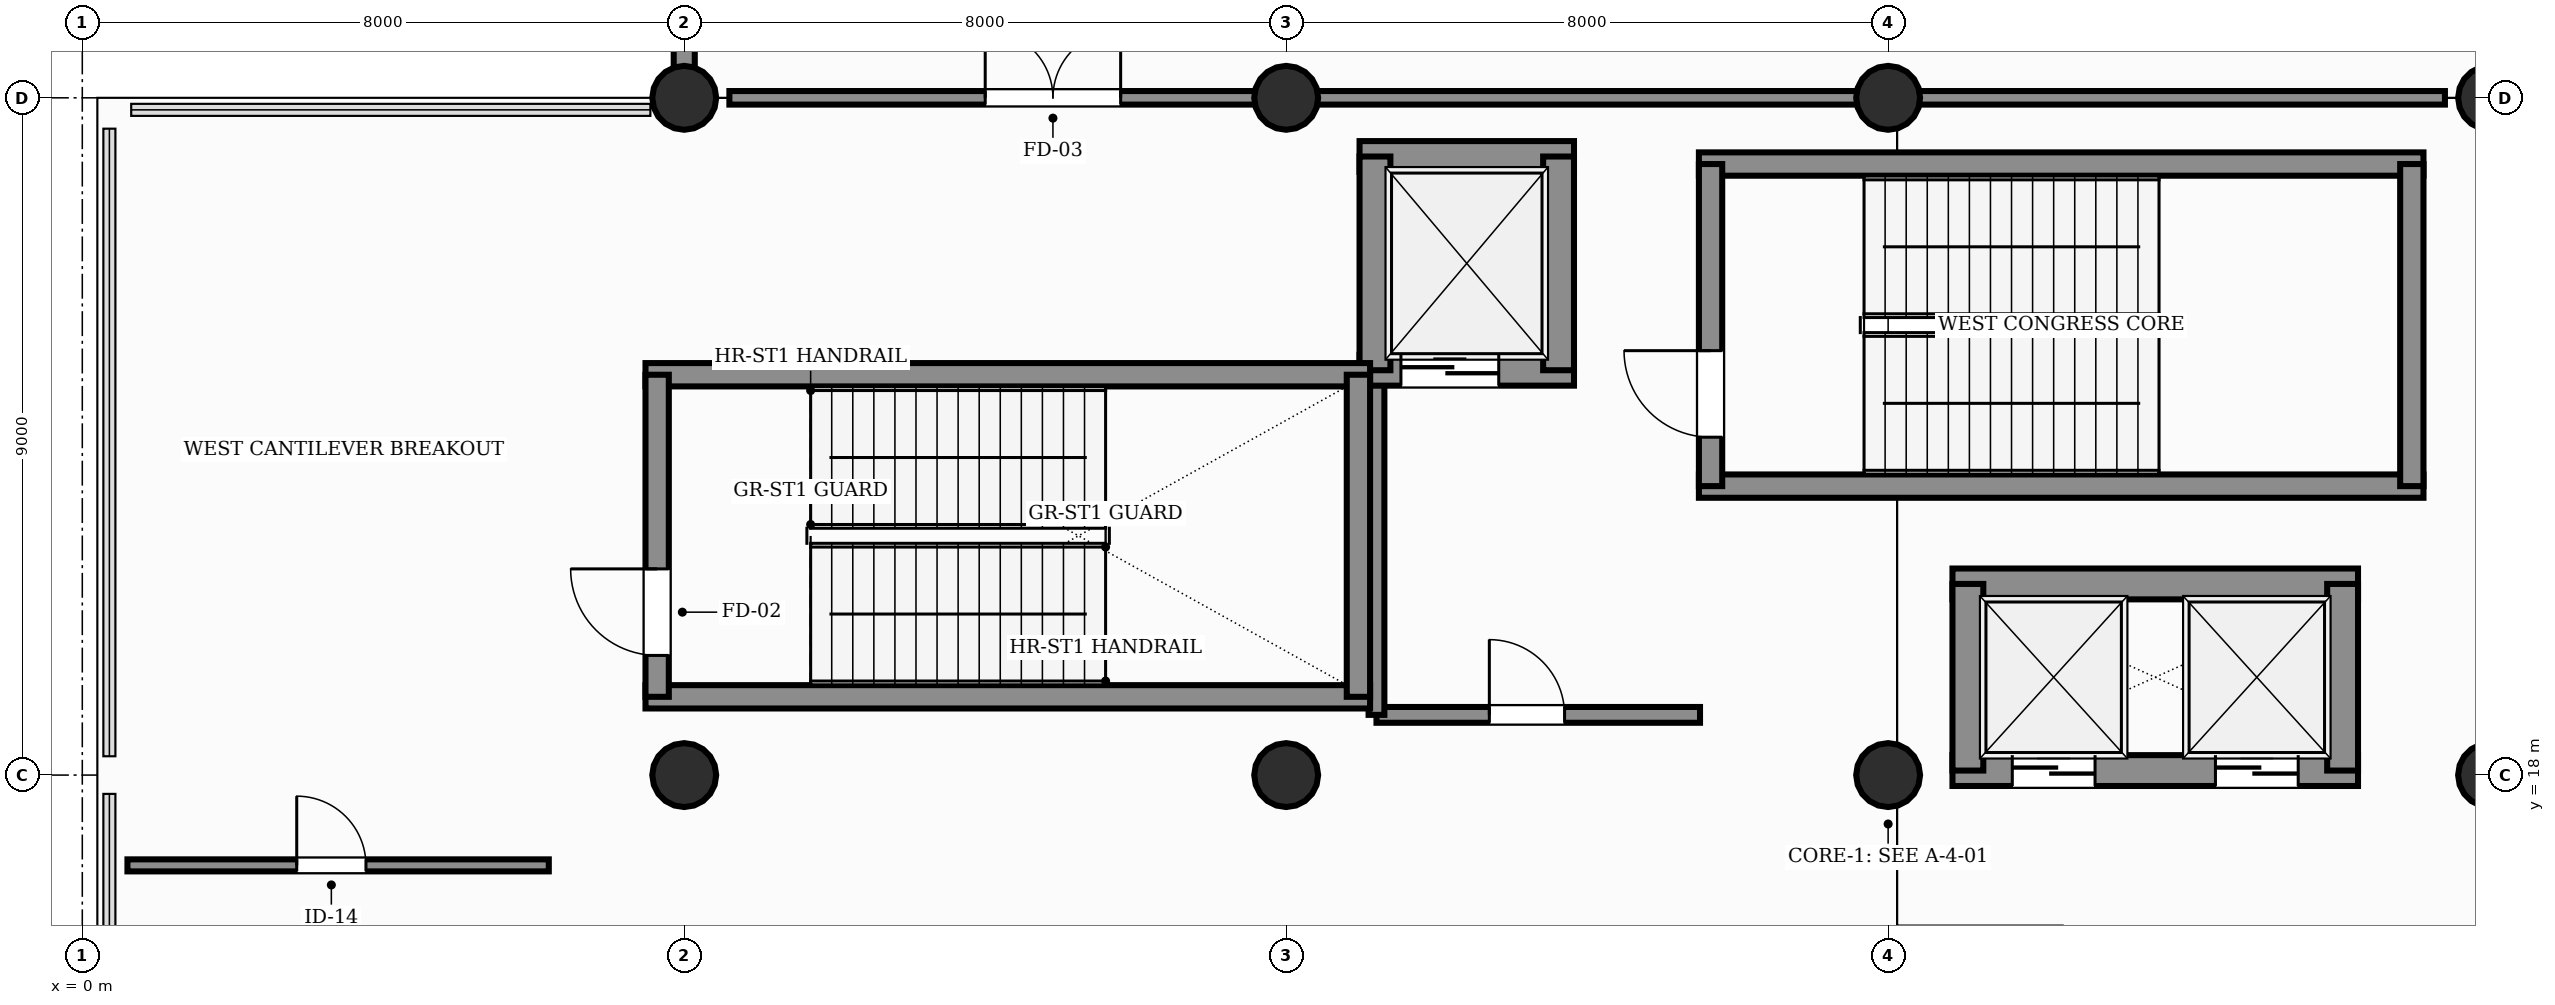
"""IFC4 building model, lengths in metres.
Left out: names, types, materials, properties, quantities, classifications, styles, units other than length and angle.
Written with IfcOpenShell. Run it as: python <this file> out.ifc"""

import sys

from ifc_helpers import new_model, si_unit, direction, frame, frame_2d, origin, origin_2d, place, context, subcontext, project, spatial, rectangle, circle, extrude, element, fill, save


model = new_model("IFC4")
c1 = context("Model", 3, precision=1e-05, world=origin(), true_north=direction((0.0, 1.0)))
c2 = subcontext(c1, "Body", "Model", "MODEL_VIEW")
j1 = project(units=[si_unit("LENGTHUNIT", "METRE"), si_unit("PLANEANGLEUNIT", "RADIAN")], contexts=[c1])
p1 = place(None, origin())
s1 = spatial("IfcSite", under=j1, at=p1, CompositionType="ELEMENT")
p2 = place(p1, origin())
s2 = spatial("IfcBuilding", under=s1, at=p2, CompositionType="ELEMENT")
p3 = place(p2, frame((0.0, 0.0, 6.0)))
s3 = spatial("IfcBuildingStorey", under=s2, at=p3, CompositionType="ELEMENT", Elevation=6.0)
for number, where, z_axis, x_axis in (
    (1, (8.0, 18.0, 0.0), (0.0, 0.0, 1.0), (1.0, 0.0, 0.0)),
    (2, (8.0, 27.0, 0.0), (0.0, 0.0, 1.0), (1.0, 0.0, 0.0)),
    (3, (16.0, 18.0, 0.0), (0.0, 0.0, 1.0), (1.0, 0.0, 0.0)),
    (4, (16.0, 27.0, 0.0), (0.0, 0.0, 1.0), (1.0, 0.0, 0.0)),
    (5, (24.0, 18.0, 0.0), (0.0, 0.0, 1.0), (1.0, 0.0, 0.0)),
    (6, (24.0, 27.0, 0.0), (0.0, 0.0, 1.0), (1.0, 0.0, 0.0)),
    (7, (32.0, 18.0, 0.0), (0.0, 0.0, 1.0), (1.0, 0.0, 0.0)),
    (8, (32.0, 27.0, 0.0), (0.0, 0.0, 1.0), (1.0, 0.0, 0.0)),
):
    element("IfcColumn", number, at=place(p3, frame(where, z_axis=z_axis, x_axis=x_axis)), inside=s3, PredefinedType="COLUMN", context=c2, shape_type="SweptSolid", body=[
        extrude(circle(Radius=0.425, at=origin_2d()), origin(), (0.0, 0.0, 1.0), 5.4),
    ])
p4 = place(p3, frame((8.0, 27.3, 0.0), z_axis=(0.0, 0.0, 1.0), x_axis=(0.0, 1.0, 0.0)))
e9 = element("IfcWall", 9, at=p4, inside=s3, PredefinedType="SOLIDWALL", context=c2, shape_type="SweptSolid", body=[
    extrude(rectangle(XDim=8.5, YDim=0.28, at=frame_2d((4.25, 0.0))), origin(), (0.0, 0.0, 1.0), 4.35),
])
p5 = place(p4, frame((5.125, 0.0, 1.1)))
e10 = element("IfcOpeningElement", 10, at=p5, cuts=e9, PredefinedType="OPENING", context=c2, shape_type="SweptSolid", body=[
    extrude(rectangle(XDim=1.45, YDim=1.3, at=frame_2d((0.725, 0.65))), frame((0.0, 0.15, 0.0), z_axis=(0.0, -1.0, 0.0), x_axis=(1.0, 0.0, 0.0)), (0.0, 0.0, 1.0), 0.3),
])
for number, where, z_axis, x_axis in (
    (11, (21.485, 21.84, 0.0), (0.0, 0.0, 1.0), (1.0, 0.0, 0.0)),
    (12, (21.485, 26.12, 0.0), (0.0, 0.0, 1.0), (1.0, 0.0, 0.0)),
):
    element("IfcWall", number, at=place(p3, frame(where, z_axis=z_axis, x_axis=x_axis)), inside=s3, PredefinedType="SHEAR", context=c2, shape_type="SweptSolid", body=[
        extrude(rectangle(XDim=9.63, YDim=0.31, at=frame_2d((4.815, 0.0))), origin(), (0.0, 0.0, 1.0), 5.4),
    ])
p6 = place(p3, frame((21.64, 21.84, 0.0), z_axis=(0.0, 0.0, 1.0), x_axis=(0.0, 1.0, 0.0)))
e13 = element("IfcWall", 13, at=p6, inside=s3, PredefinedType="SHEAR", context=c2, shape_type="SweptSolid", body=[
    extrude(rectangle(XDim=4.28, YDim=0.31, at=frame_2d((2.14, 0.0))), origin(), (0.0, 0.0, 1.0), 5.4),
])
p7 = place(p6, frame((0.65, 0.0, 0.0)))
e14 = element("IfcOpeningElement", 14, at=p7, cuts=e13, PredefinedType="OPENING", context=c2, shape_type="SweptSolid", body=[
    extrude(rectangle(XDim=1.15, YDim=2.2, at=frame_2d((0.575, 1.1))), frame((0.0, 0.165, 0.0), z_axis=(0.0, -1.0, 0.0), x_axis=(1.0, 0.0, 0.0)), (0.0, 0.0, 1.0), 0.33),
])
p8 = place(p3, frame((30.96, 21.84, 0.0), z_axis=(0.0, 0.0, 1.0), x_axis=(0.0, 1.0, 0.0)))
e15 = element("IfcWall", 15, at=p8, inside=s3, PredefinedType="SHEAR", context=c2, shape_type="SweptSolid", body=[
    extrude(rectangle(XDim=4.28, YDim=0.31, at=frame_2d((2.14, 0.0))), origin(), (0.0, 0.0, 1.0), 5.4),
])
p9 = place(p3, frame((17.2, 18.8, 0.0), z_axis=(0.0, 0.0, 1.0), x_axis=(1.0, 0.0, 0.0)))
e16 = element("IfcWall", 16, at=p9, inside=s3, PredefinedType="PARTITIONING", context=c2, shape_type="SweptSolid", body=[
    extrude(rectangle(XDim=4.3, YDim=0.21, at=frame_2d((2.15, 0.0))), origin(), (0.0, 0.0, 1.0), 3.85),
])
p10 = place(p9, frame((1.5, 0.0, 0.0)))
e17 = element("IfcOpeningElement", 17, at=p10, cuts=e16, PredefinedType="OPENING", context=c2, shape_type="SweptSolid", body=[
    extrude(rectangle(XDim=1.0, YDim=2.15, at=frame_2d((0.5, 1.075))), frame((0.0, 0.115, 0.0), z_axis=(0.0, -1.0, 0.0), x_axis=(1.0, 0.0, 0.0)), (0.0, 0.0, 1.0), 0.23),
])
p11 = place(p3, frame((17.2, 18.8, 0.0), z_axis=(0.0, 0.0, 1.0), x_axis=(0.0, 1.0, 0.0)))
e18 = element("IfcWall", 18, at=p11, inside=s3, PredefinedType="PARTITIONING", context=c2, shape_type="SweptSolid", body=[
    extrude(rectangle(XDim=4.6, YDim=0.21, at=frame_2d((2.3, 0.0))), origin(), (0.0, 0.0, 1.0), 3.85),
])
p12 = place(p3, frame((16.975, 23.38, 0.0), z_axis=(0.0, 0.0, 1.0), x_axis=(1.0, 0.0, 0.0)))
e19 = element("IfcWall", 19, at=p12, inside=s3, PredefinedType="SHEAR", context=c2, shape_type="SweptSolid", body=[
    extrude(rectangle(XDim=2.85, YDim=0.41, at=frame_2d((1.425, 0.0))), origin(), (0.0, 0.0, 1.0), 5.4),
])
p13 = place(p12, frame((0.55, 0.0, 0.0)))
e20 = element("IfcOpeningElement", 20, at=p13, cuts=e19, PredefinedType="OPENING", context=c2, shape_type="SweptSolid", body=[
    extrude(rectangle(XDim=1.3, YDim=2.25, at=frame_2d((0.65, 1.125))), frame((0.0, 0.215, 0.0), z_axis=(0.0, -1.0, 0.0), x_axis=(1.0, 0.0, 0.0)), (0.0, 0.0, 1.0), 0.43),
])
p14 = place(p3, frame((16.975, 26.22, 0.0), z_axis=(0.0, 0.0, 1.0), x_axis=(1.0, 0.0, 0.0)))
e21 = element("IfcWall", 21, at=p14, inside=s3, PredefinedType="SHEAR", context=c2, shape_type="SweptSolid", body=[
    extrude(rectangle(XDim=2.85, YDim=0.41, at=frame_2d((1.425, 0.0))), origin(), (0.0, 0.0, 1.0), 5.4),
])
for number, where, z_axis, x_axis in (
    (22, (17.18, 23.38, 0.0), (0.0, 0.0, 1.0), (0.0, 1.0, 0.0)),
    (23, (19.62, 23.38, 0.0), (0.0, 0.0, 1.0), (0.0, 1.0, 0.0)),
):
    element("IfcWall", number, at=place(p3, frame(where, z_axis=z_axis, x_axis=x_axis)), inside=s3, PredefinedType="SHEAR", context=c2, shape_type="SweptSolid", body=[
        extrude(rectangle(XDim=2.84, YDim=0.41, at=frame_2d((1.42, 0.0))), origin(), (0.0, 0.0, 1.0), 5.4),
    ])
p15 = place(p3, frame((24.855, 18.06, 0.0), z_axis=(0.0, 0.0, 1.0), x_axis=(1.0, 0.0, 0.0)))
e24 = element("IfcWall", 24, at=p15, inside=s3, PredefinedType="SHEAR", context=c2, shape_type="SweptSolid", body=[
    extrude(rectangle(XDim=5.39, YDim=0.41, at=frame_2d((2.695, 0.0))), origin(), (0.0, 0.0, 1.0), 5.4),
])
p16 = place(p15, frame((0.795, 0.0, 0.0)))
e25 = element("IfcOpeningElement", 25, at=p16, cuts=e24, PredefinedType="OPENING", context=c2, shape_type="SweptSolid", body=[
    extrude(rectangle(XDim=1.1, YDim=2.2, at=frame_2d((0.55, 1.1))), frame((0.0, 0.215, 0.0), z_axis=(0.0, -1.0, 0.0), x_axis=(1.0, 0.0, 0.0)), (0.0, 0.0, 1.0), 0.43),
])
p17 = place(p15, frame((3.495, 0.0, 0.0)))
e26 = element("IfcOpeningElement", 26, at=p17, cuts=e24, PredefinedType="OPENING", context=c2, shape_type="SweptSolid", body=[
    extrude(rectangle(XDim=1.1, YDim=2.2, at=frame_2d((0.55, 1.1))), frame((0.0, 0.215, 0.0), z_axis=(0.0, -1.0, 0.0), x_axis=(1.0, 0.0, 0.0)), (0.0, 0.0, 1.0), 0.43),
])
p18 = place(p3, frame((24.855, 20.54, 0.0), z_axis=(0.0, 0.0, 1.0), x_axis=(1.0, 0.0, 0.0)))
e27 = element("IfcWall", 27, at=p18, inside=s3, PredefinedType="SHEAR", context=c2, shape_type="SweptSolid", body=[
    extrude(rectangle(XDim=5.39, YDim=0.41, at=frame_2d((2.695, 0.0))), origin(), (0.0, 0.0, 1.0), 5.4),
])
for number, where, z_axis, x_axis in (
    (28, (25.06, 18.06, 0.0), (0.0, 0.0, 1.0), (0.0, 1.0, 0.0)),
    (29, (30.04, 18.06, 0.0), (0.0, 0.0, 1.0), (0.0, 1.0, 0.0)),
):
    element("IfcWall", number, at=place(p3, frame(where, z_axis=z_axis, x_axis=x_axis)), inside=s3, PredefinedType="SHEAR", context=c2, shape_type="SweptSolid", body=[
        extrude(rectangle(XDim=2.48, YDim=0.41, at=frame_2d((1.24, 0.0))), origin(), (0.0, 0.0, 1.0), 5.4),
    ])
for number, where, z_axis, x_axis in (
    (30, (7.485, 19.04, 0.0), (0.0, 0.0, 1.0), (1.0, 0.0, 0.0)),
    (31, (7.485, 23.32, 0.0), (0.0, 0.0, 1.0), (1.0, 0.0, 0.0)),
):
    element("IfcWall", number, at=place(p3, frame(where, z_axis=z_axis, x_axis=x_axis)), inside=s3, PredefinedType="SHEAR", context=c2, shape_type="SweptSolid", body=[
        extrude(rectangle(XDim=9.63, YDim=0.31, at=frame_2d((4.815, 0.0))), origin(), (0.0, 0.0, 1.0), 5.4),
    ])
p19 = place(p3, frame((7.64, 19.04, 0.0), z_axis=(0.0, 0.0, 1.0), x_axis=(0.0, 1.0, 0.0)))
e32 = element("IfcWall", 32, at=p19, inside=s3, PredefinedType="SHEAR", context=c2, shape_type="SweptSolid", body=[
    extrude(rectangle(XDim=4.28, YDim=0.31, at=frame_2d((2.14, 0.0))), origin(), (0.0, 0.0, 1.0), 5.4),
])
p20 = place(p19, frame((0.55, 0.0, 0.0)))
e33 = element("IfcOpeningElement", 33, at=p20, cuts=e32, PredefinedType="OPENING", context=c2, shape_type="SweptSolid", body=[
    extrude(rectangle(XDim=1.15, YDim=2.2, at=frame_2d((0.575, 1.1))), frame((0.0, 0.165, 0.0), z_axis=(0.0, -1.0, 0.0), x_axis=(1.0, 0.0, 0.0)), (0.0, 0.0, 1.0), 0.33),
])
p21 = place(p3, frame((16.96, 19.04, 0.0), z_axis=(0.0, 0.0, 1.0), x_axis=(0.0, 1.0, 0.0)))
e34 = element("IfcWall", 34, at=p21, inside=s3, PredefinedType="SHEAR", context=c2, shape_type="SweptSolid", body=[
    extrude(rectangle(XDim=4.28, YDim=0.31, at=frame_2d((2.14, 0.0))), origin(), (0.0, 0.0, 1.0), 5.4),
])
p22 = place(p3, frame((0.6, 16.8, 0.0), z_axis=(0.0, 0.0, 1.0), x_axis=(1.0, 0.0, 0.0)))
e35 = element("IfcWall", 35, at=p22, inside=s3, PredefinedType="PARTITIONING", context=c2, shape_type="SweptSolid", body=[
    extrude(rectangle(XDim=5.6, YDim=0.16, at=frame_2d((2.8, 0.0))), origin(), (0.0, 0.0, 1.0), 3.85),
])
p23 = place(p22, frame((2.25, 0.0, 0.0)))
e36 = element("IfcOpeningElement", 36, at=p23, cuts=e35, PredefinedType="OPENING", context=c2, shape_type="SweptSolid", body=[
    extrude(rectangle(XDim=0.92, YDim=2.15, at=frame_2d((0.46, 1.075))), frame((0.0, 0.09, 0.0), z_axis=(0.0, -1.0, 0.0), x_axis=(1.0, 0.0, 0.0)), (0.0, 0.0, 1.0), 0.18),
])
p24 = place(p3, frame((8.6, 27.0, 0.0), z_axis=(0.0, 0.0, 1.0), x_axis=(1.0, 0.0, 0.0)))
e37 = element("IfcWall", 37, at=p24, inside=s3, PredefinedType="PARTITIONING", context=c2, shape_type="SweptSolid", body=[
    extrude(rectangle(XDim=22.8, YDim=0.18, at=frame_2d((11.4, 0.0))), origin(), (0.0, 0.0, 1.0), 3.85),
])
p25 = place(p24, frame((3.4, 0.0, 0.0)))
e38 = element("IfcOpeningElement", 38, at=p25, cuts=e37, PredefinedType="OPENING", context=c2, shape_type="SweptSolid", body=[
    extrude(rectangle(XDim=1.8, YDim=2.25, at=frame_2d((0.9, 1.125))), frame((0.0, 0.1, 0.0), z_axis=(0.0, -1.0, 0.0), x_axis=(1.0, 0.0, 0.0)), (0.0, 0.0, 1.0), 0.2),
])
p26 = place(p7, origin())
e39 = element("IfcDoor", 39, at=p26, inside=s3, OperationType="SINGLE_SWING_RIGHT", PredefinedType="DOOR", context=c2, shape_type="SweptSolid", body=[
    extrude(rectangle(XDim=1.15, YDim=2.2, at=frame_2d((0.575, 1.1))), frame((0.0, 0.025, 0.0), z_axis=(0.0, -1.0, 0.0), x_axis=(1.0, 0.0, 0.0)), (0.0, 0.0, 1.0), 0.05),
])
fill(e14, e39)
p27 = place(p10, origin())
e40 = element("IfcDoor", 40, at=p27, inside=s3, OperationType="SINGLE_SWING_LEFT", PredefinedType="DOOR", context=c2, shape_type="SweptSolid", body=[
    extrude(rectangle(XDim=1.0, YDim=2.15, at=frame_2d((0.5, 1.075))), frame((0.0, 0.025, 0.0), z_axis=(0.0, -1.0, 0.0), x_axis=(1.0, 0.0, 0.0)), (0.0, 0.0, 1.0), 0.05),
])
fill(e17, e40)
p28 = place(p13, origin())
e41 = element("IfcDoor", 41, at=p28, inside=s3, OperationType="DOUBLE_DOOR_SLIDING", PredefinedType="DOOR", context=c2, shape_type="SweptSolid", body=[
    extrude(rectangle(XDim=1.3, YDim=2.25, at=frame_2d((0.65, 1.125))), frame((0.0, 0.025, 0.0), z_axis=(0.0, -1.0, 0.0), x_axis=(1.0, 0.0, 0.0)), (0.0, 0.0, 1.0), 0.05),
])
fill(e20, e41)
p29 = place(p16, origin())
e42 = element("IfcDoor", 42, at=p29, inside=s3, OperationType="DOUBLE_DOOR_SLIDING", PredefinedType="DOOR", context=c2, shape_type="SweptSolid", body=[
    extrude(rectangle(XDim=1.1, YDim=2.2, at=frame_2d((0.55, 1.1))), frame((0.0, 0.025, 0.0), z_axis=(0.0, -1.0, 0.0), x_axis=(1.0, 0.0, 0.0)), (0.0, 0.0, 1.0), 0.05),
])
fill(e25, e42)
p30 = place(p17, origin())
e43 = element("IfcDoor", 43, at=p30, inside=s3, OperationType="DOUBLE_DOOR_SLIDING", PredefinedType="DOOR", context=c2, shape_type="SweptSolid", body=[
    extrude(rectangle(XDim=1.1, YDim=2.2, at=frame_2d((0.55, 1.1))), frame((0.0, 0.025, 0.0), z_axis=(0.0, -1.0, 0.0), x_axis=(1.0, 0.0, 0.0)), (0.0, 0.0, 1.0), 0.05),
])
fill(e26, e43)
p31 = place(p20, origin())
e44 = element("IfcDoor", 44, at=p31, inside=s3, OperationType="SINGLE_SWING_RIGHT", PredefinedType="DOOR", context=c2, shape_type="SweptSolid", body=[
    extrude(rectangle(XDim=1.15, YDim=2.2, at=frame_2d((0.575, 1.1))), frame((0.0, 0.025, 0.0), z_axis=(0.0, -1.0, 0.0), x_axis=(1.0, 0.0, 0.0)), (0.0, 0.0, 1.0), 0.05),
])
fill(e33, e44)
p32 = place(p23, origin())
e45 = element("IfcDoor", 45, at=p32, inside=s3, OperationType="SINGLE_SWING_LEFT", PredefinedType="DOOR", context=c2, shape_type="SweptSolid", body=[
    extrude(rectangle(XDim=0.92, YDim=2.15, at=frame_2d((0.46, 1.075))), frame((0.0, 0.025, 0.0), z_axis=(0.0, -1.0, 0.0), x_axis=(1.0, 0.0, 0.0)), (0.0, 0.0, 1.0), 0.05),
])
fill(e36, e45)
p33 = place(p25, origin())
e46 = element("IfcDoor", 46, at=p33, inside=s3, OperationType="DOUBLE_DOOR_SINGLE_SWING", PredefinedType="DOOR", context=c2, shape_type="SweptSolid", body=[
    extrude(rectangle(XDim=1.8, YDim=2.25, at=frame_2d((0.9, 1.125))), frame((0.0, 0.025, 0.0), z_axis=(0.0, -1.0, 0.0), x_axis=(1.0, 0.0, 0.0)), (0.0, 0.0, 1.0), 0.05),
])
fill(e38, e46)
save(model, sys.argv[1])
